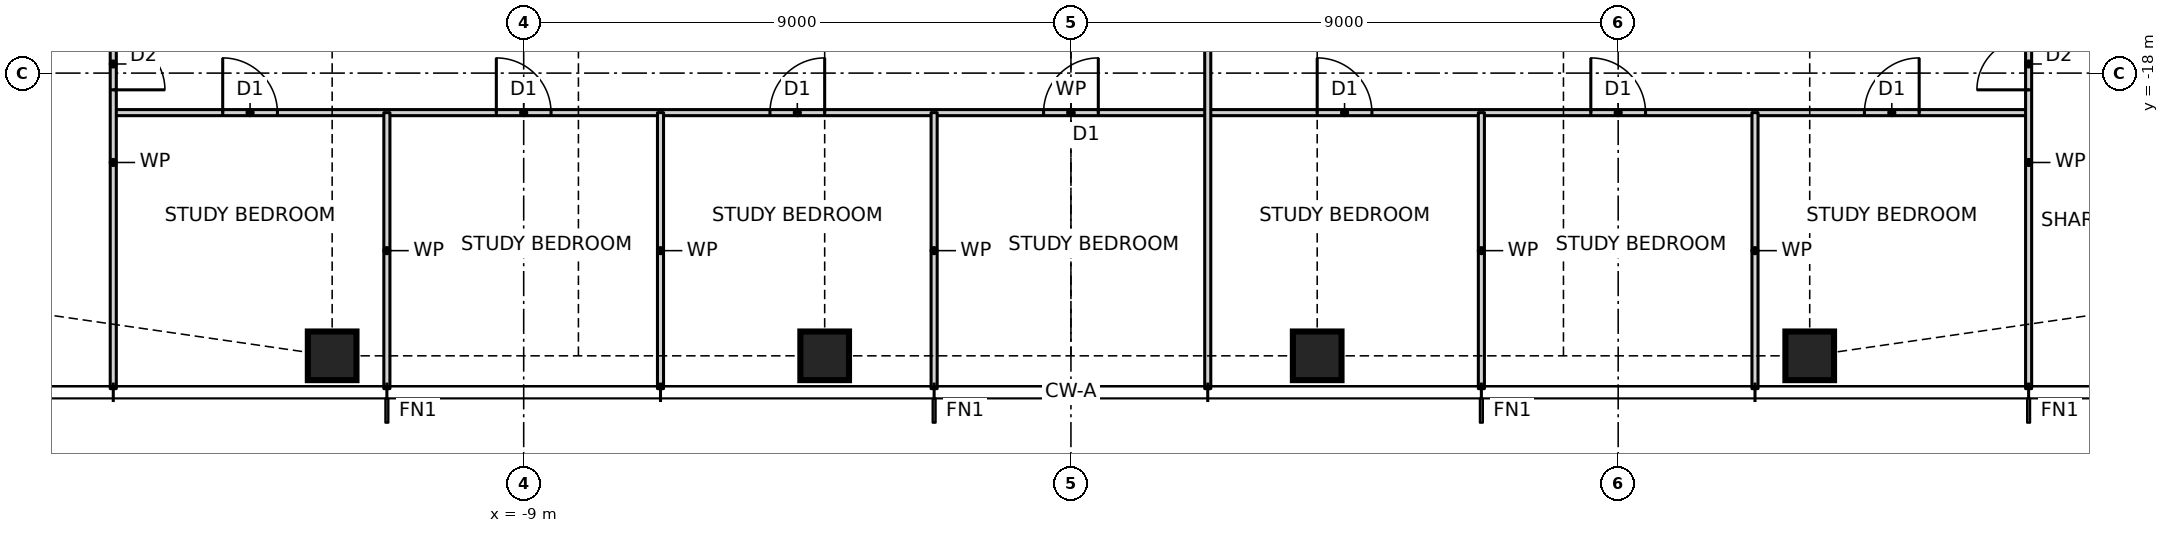
"""IFC4 building model, lengths in metres.
Left out: names, types, materials, properties, quantities, classifications, styles, units other than length and angle.
Written with IfcOpenShell. Run it as: python <this file> out.ifc"""

import sys

from ifc_helpers import new_model, si_unit, direction, frame, frame_2d, origin, origin_2d, place, context, subcontext, project, spatial, rectangle, hollow_rectangle, extrude, element, fill, save


model = new_model("IFC4")
c1 = context("Model", 3, precision=1e-05, world=origin(), true_north=direction((0.0, 1.0)))
c2 = subcontext(c1, "Body", "Model", "MODEL_VIEW")
j1 = project(units=[si_unit("LENGTHUNIT", "METRE"), si_unit("PLANEANGLEUNIT", "RADIAN")], contexts=[c1])
p1 = place(None, origin())
s1 = spatial("IfcSite", under=j1, at=p1, CompositionType="ELEMENT")
p2 = place(p1, origin())
s2 = spatial("IfcBuilding", under=s1, at=p2, CompositionType="ELEMENT")
p3 = place(p2, frame((0.0, 0.0, 67.5)))
s3 = spatial("IfcBuildingStorey", under=s2, at=p3, CompositionType="ELEMENT", Elevation=67.5)
for number, where, z_axis, x_axis in (
    (1, (-12.15, -22.65, 0.0), (0.0, 0.0, 1.0), (1.0, 0.0, 0.0)),
    (2, (-4.05, -22.65, 0.0), (0.0, 0.0, 1.0), (1.0, 0.0, 0.0)),
    (3, (4.05, -22.65, 0.0), (0.0, 0.0, 1.0), (1.0, 0.0, 0.0)),
    (4, (12.15, -22.65, 0.0), (0.0, 0.0, 1.0), (1.0, 0.0, 0.0)),
):
    element("IfcColumn", number, at=place(p3, frame(where, z_axis=z_axis, x_axis=x_axis)), inside=s3, PredefinedType="COLUMN", context=c2, shape_type="SweptSolid", body=[
        extrude(hollow_rectangle(XDim=0.8, YDim=0.8, WallThickness=0.09, at=origin_2d()), origin(), (0.0, 0.0, 1.0), 3.5),
    ])
p4 = place(p3, frame((-15.75, -18.65, 0.0), z_axis=(0.0, 0.0, 1.0), x_axis=(1.0, 0.0, 0.0)))
e5 = element("IfcWall", 5, at=p4, inside=s3, PredefinedType="PARTITIONING", context=c2, shape_type="SweptSolid", body=[
    extrude(rectangle(XDim=31.5, YDim=0.1, at=frame_2d((15.75, 0.0))), origin(), (0.0, 0.0, 1.0), 3.27),
])
p5 = place(p4, frame((1.8, 0.0, 0.0)))
e6 = element("IfcOpeningElement", 6, at=p5, cuts=e5, PredefinedType="OPENING", context=c2, shape_type="SweptSolid", body=[
    extrude(rectangle(XDim=0.9, YDim=2.1, at=frame_2d((0.45, 1.05))), frame((0.0, 0.06, 0.0), z_axis=(0.0, -1.0, 0.0), x_axis=(1.0, 0.0, 0.0)), (0.0, 0.0, 1.0), 0.12),
])
p6 = place(p4, frame((6.3, 0.0, 0.0)))
e7 = element("IfcOpeningElement", 7, at=p6, cuts=e5, PredefinedType="OPENING", context=c2, shape_type="SweptSolid", body=[
    extrude(rectangle(XDim=0.9, YDim=2.1, at=frame_2d((0.45, 1.05))), frame((0.0, 0.06, 0.0), z_axis=(0.0, -1.0, 0.0), x_axis=(1.0, 0.0, 0.0)), (0.0, 0.0, 1.0), 0.12),
])
p7 = place(p4, frame((10.8, 0.0, 0.0)))
e8 = element("IfcOpeningElement", 8, at=p7, cuts=e5, PredefinedType="OPENING", context=c2, shape_type="SweptSolid", body=[
    extrude(rectangle(XDim=0.9, YDim=2.1, at=frame_2d((0.45, 1.05))), frame((0.0, 0.06, 0.0), z_axis=(0.0, -1.0, 0.0), x_axis=(1.0, 0.0, 0.0)), (0.0, 0.0, 1.0), 0.12),
])
p8 = place(p4, frame((15.3, 0.0, 0.0)))
e9 = element("IfcOpeningElement", 9, at=p8, cuts=e5, PredefinedType="OPENING", context=c2, shape_type="SweptSolid", body=[
    extrude(rectangle(XDim=0.9, YDim=2.1, at=frame_2d((0.45, 1.05))), frame((0.0, 0.06, 0.0), z_axis=(0.0, -1.0, 0.0), x_axis=(1.0, 0.0, 0.0)), (0.0, 0.0, 1.0), 0.12),
])
p9 = place(p4, frame((19.8, 0.0, 0.0)))
e10 = element("IfcOpeningElement", 10, at=p9, cuts=e5, PredefinedType="OPENING", context=c2, shape_type="SweptSolid", body=[
    extrude(rectangle(XDim=0.9, YDim=2.1, at=frame_2d((0.45, 1.05))), frame((0.0, 0.06, 0.0), z_axis=(0.0, -1.0, 0.0), x_axis=(1.0, 0.0, 0.0)), (0.0, 0.0, 1.0), 0.12),
])
p10 = place(p4, frame((24.3, 0.0, 0.0)))
e11 = element("IfcOpeningElement", 11, at=p10, cuts=e5, PredefinedType="OPENING", context=c2, shape_type="SweptSolid", body=[
    extrude(rectangle(XDim=0.9, YDim=2.1, at=frame_2d((0.45, 1.05))), frame((0.0, 0.06, 0.0), z_axis=(0.0, -1.0, 0.0), x_axis=(1.0, 0.0, 0.0)), (0.0, 0.0, 1.0), 0.12),
])
p11 = place(p4, frame((28.8, 0.0, 0.0)))
e12 = element("IfcOpeningElement", 12, at=p11, cuts=e5, PredefinedType="OPENING", context=c2, shape_type="SweptSolid", body=[
    extrude(rectangle(XDim=0.9, YDim=2.1, at=frame_2d((0.45, 1.05))), frame((0.0, 0.06, 0.0), z_axis=(0.0, -1.0, 0.0), x_axis=(1.0, 0.0, 0.0)), (0.0, 0.0, 1.0), 0.12),
])
p12 = place(p3, frame((15.75, -23.19, 0.0), z_axis=(0.0, 0.0, 1.0), x_axis=(0.0, 1.0, 0.0)))
e13 = element("IfcWall", 13, at=p12, inside=s3, PredefinedType="PARTITIONING", context=c2, shape_type="SweptSolid", body=[
    extrude(rectangle(XDim=7.44, YDim=0.1, at=frame_2d((3.72, 0.0))), origin(), (0.0, 0.0, 1.0), 3.27),
])
p13 = place(p12, frame((4.915, 0.0, 0.0)))
e14 = element("IfcOpeningElement", 14, at=p13, cuts=e13, PredefinedType="OPENING", context=c2, shape_type="SweptSolid", body=[
    extrude(rectangle(XDim=0.85, YDim=2.1, at=frame_2d((0.425, 1.05))), frame((0.0, 0.06, 0.0), z_axis=(0.0, -1.0, 0.0), x_axis=(1.0, 0.0, 0.0)), (0.0, 0.0, 1.0), 0.12),
])
for number, where, z_axis, x_axis in (
    (15, (11.25, -23.19, 0.0), (0.0, 0.0, 1.0), (0.0, 1.0, 0.0)),
    (16, (6.75, -23.19, 0.0), (0.0, 0.0, 1.0), (0.0, 1.0, 0.0)),
):
    element("IfcWall", number, at=place(p3, frame(where, z_axis=z_axis, x_axis=x_axis)), inside=s3, PredefinedType="PARTITIONING", context=c2, shape_type="SweptSolid", body=[
        extrude(rectangle(XDim=4.54, YDim=0.1, at=frame_2d((2.27, 0.0))), origin(), (0.0, 0.0, 1.0), 3.27),
    ])
p14 = place(p3, frame((2.25, -23.19, 0.0), z_axis=(0.0, 0.0, 1.0), x_axis=(0.0, 1.0, 0.0)))
e17 = element("IfcWall", 17, at=p14, inside=s3, PredefinedType="PARTITIONING", context=c2, shape_type="SweptSolid", body=[
    extrude(rectangle(XDim=11.59, YDim=0.1, at=frame_2d((5.795, 0.0))), origin(), (0.0, 0.0, 1.0), 3.27),
])
for number, where, z_axis, x_axis in (
    (18, (-2.25, -23.19, 0.0), (0.0, 0.0, 1.0), (0.0, 1.0, 0.0)),
    (19, (-6.75, -23.19, 0.0), (0.0, 0.0, 1.0), (0.0, 1.0, 0.0)),
    (20, (-11.25, -23.19, 0.0), (0.0, 0.0, 1.0), (0.0, 1.0, 0.0)),
):
    element("IfcWall", number, at=place(p3, frame(where, z_axis=z_axis, x_axis=x_axis)), inside=s3, PredefinedType="PARTITIONING", context=c2, shape_type="SweptSolid", body=[
        extrude(rectangle(XDim=4.54, YDim=0.1, at=frame_2d((2.27, 0.0))), origin(), (0.0, 0.0, 1.0), 3.27),
    ])
p15 = place(p3, frame((-15.75, -23.19, 0.0), z_axis=(0.0, 0.0, 1.0), x_axis=(0.0, 1.0, 0.0)))
e21 = element("IfcWall", 21, at=p15, inside=s3, PredefinedType="PARTITIONING", context=c2, shape_type="SweptSolid", body=[
    extrude(rectangle(XDim=7.44, YDim=0.1, at=frame_2d((3.72, 0.0))), origin(), (0.0, 0.0, 1.0), 3.27),
])
p16 = place(p15, frame((4.915, 0.0, 0.0)))
e22 = element("IfcOpeningElement", 22, at=p16, cuts=e21, PredefinedType="OPENING", context=c2, shape_type="SweptSolid", body=[
    extrude(rectangle(XDim=0.85, YDim=2.1, at=frame_2d((0.425, 1.05))), frame((0.0, 0.06, 0.0), z_axis=(0.0, -1.0, 0.0), x_axis=(1.0, 0.0, 0.0)), (0.0, 0.0, 1.0), 0.12),
])
p17 = place(p5, origin())
e23 = element("IfcDoor", 23, at=p17, inside=s3, OperationType="SINGLE_SWING_LEFT", PredefinedType="DOOR", context=c2, shape_type="SweptSolid", body=[
    extrude(rectangle(XDim=0.9, YDim=2.1, at=frame_2d((0.45, 1.05))), frame((0.0, 0.025, 0.0), z_axis=(0.0, -1.0, 0.0), x_axis=(1.0, 0.0, 0.0)), (0.0, 0.0, 1.0), 0.05),
])
fill(e6, e23)
p18 = place(p6, origin())
e24 = element("IfcDoor", 24, at=p18, inside=s3, OperationType="SINGLE_SWING_LEFT", PredefinedType="DOOR", context=c2, shape_type="SweptSolid", body=[
    extrude(rectangle(XDim=0.9, YDim=2.1, at=frame_2d((0.45, 1.05))), frame((0.0, 0.025, 0.0), z_axis=(0.0, -1.0, 0.0), x_axis=(1.0, 0.0, 0.0)), (0.0, 0.0, 1.0), 0.05),
])
fill(e7, e24)
p19 = place(p7, origin())
e25 = element("IfcDoor", 25, at=p19, inside=s3, OperationType="SINGLE_SWING_RIGHT", PredefinedType="DOOR", context=c2, shape_type="SweptSolid", body=[
    extrude(rectangle(XDim=0.9, YDim=2.1, at=frame_2d((0.45, 1.05))), frame((0.0, 0.025, 0.0), z_axis=(0.0, -1.0, 0.0), x_axis=(1.0, 0.0, 0.0)), (0.0, 0.0, 1.0), 0.05),
])
fill(e8, e25)
p20 = place(p8, origin())
e26 = element("IfcDoor", 26, at=p20, inside=s3, OperationType="SINGLE_SWING_RIGHT", PredefinedType="DOOR", context=c2, shape_type="SweptSolid", body=[
    extrude(rectangle(XDim=0.9, YDim=2.1, at=frame_2d((0.45, 1.05))), frame((0.0, 0.025, 0.0), z_axis=(0.0, -1.0, 0.0), x_axis=(1.0, 0.0, 0.0)), (0.0, 0.0, 1.0), 0.05),
])
fill(e9, e26)
p21 = place(p9, origin())
e27 = element("IfcDoor", 27, at=p21, inside=s3, OperationType="SINGLE_SWING_LEFT", PredefinedType="DOOR", context=c2, shape_type="SweptSolid", body=[
    extrude(rectangle(XDim=0.9, YDim=2.1, at=frame_2d((0.45, 1.05))), frame((0.0, 0.025, 0.0), z_axis=(0.0, -1.0, 0.0), x_axis=(1.0, 0.0, 0.0)), (0.0, 0.0, 1.0), 0.05),
])
fill(e10, e27)
p22 = place(p10, origin())
e28 = element("IfcDoor", 28, at=p22, inside=s3, OperationType="SINGLE_SWING_LEFT", PredefinedType="DOOR", context=c2, shape_type="SweptSolid", body=[
    extrude(rectangle(XDim=0.9, YDim=2.1, at=frame_2d((0.45, 1.05))), frame((0.0, 0.025, 0.0), z_axis=(0.0, -1.0, 0.0), x_axis=(1.0, 0.0, 0.0)), (0.0, 0.0, 1.0), 0.05),
])
fill(e11, e28)
p23 = place(p11, origin())
e29 = element("IfcDoor", 29, at=p23, inside=s3, OperationType="SINGLE_SWING_RIGHT", PredefinedType="DOOR", context=c2, shape_type="SweptSolid", body=[
    extrude(rectangle(XDim=0.9, YDim=2.1, at=frame_2d((0.45, 1.05))), frame((0.0, 0.025, 0.0), z_axis=(0.0, -1.0, 0.0), x_axis=(1.0, 0.0, 0.0)), (0.0, 0.0, 1.0), 0.05),
])
fill(e12, e29)
p24 = place(p16, frame((0.85, 0.0, 0.0), z_axis=(0.0, 0.0, 1.0), x_axis=(-1.0, 0.0, 0.0)))
e30 = element("IfcDoor", 30, at=p24, inside=s3, OperationType="SINGLE_SWING_RIGHT", PredefinedType="DOOR", context=c2, shape_type="SweptSolid", body=[
    extrude(rectangle(XDim=0.85, YDim=2.1, at=frame_2d((0.425, 1.05))), frame((0.0, 0.025, 0.0), z_axis=(0.0, -1.0, 0.0), x_axis=(1.0, 0.0, 0.0)), (0.0, 0.0, 1.0), 0.05),
])
fill(e22, e30)
p25 = place(p13, origin())
e31 = element("IfcDoor", 31, at=p25, inside=s3, OperationType="SINGLE_SWING_LEFT", PredefinedType="DOOR", context=c2, shape_type="SweptSolid", body=[
    extrude(rectangle(XDim=0.85, YDim=2.1, at=frame_2d((0.425, 1.05))), frame((0.0, 0.025, 0.0), z_axis=(0.0, -1.0, 0.0), x_axis=(1.0, 0.0, 0.0)), (0.0, 0.0, 1.0), 0.05),
])
fill(e14, e31)
save(model, sys.argv[1])
